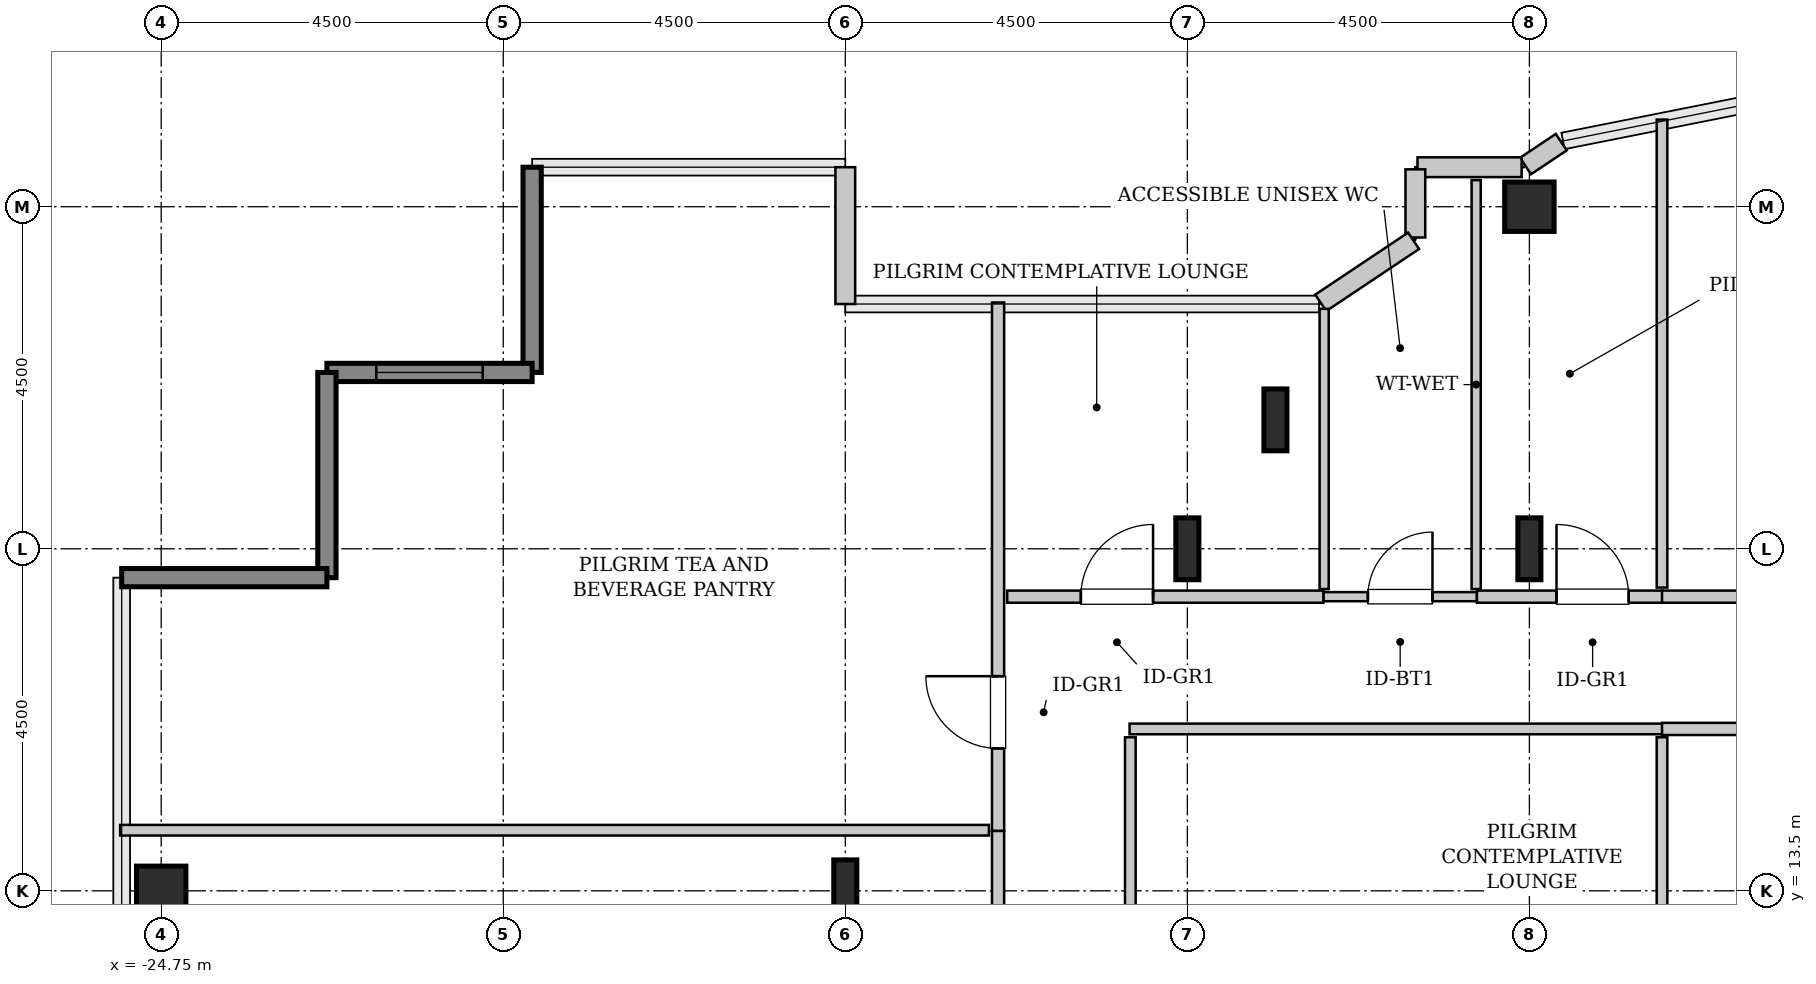
"""IFC4 building model, lengths in metres.
Left out: names, types, materials, properties, quantities, classifications, styles, units other than length and angle.
Written with IfcOpenShell. Run it as: python <this file> out.ifc"""

import sys

from ifc_helpers import new_model, si_unit, direction, frame, frame_2d, origin, origin_2d, place, context, subcontext, project, spatial, rectangle, hollow_rectangle, i_section, extrude, source, transform, mapped, element, fill, save


model = new_model("IFC4")
c1 = context("Model", 3, precision=1e-05, world=origin(), true_north=direction((0.0, 1.0)))
c2 = subcontext(c1, "Body", "Model", "MODEL_VIEW")
j1 = project(units=[si_unit("LENGTHUNIT", "METRE"), si_unit("PLANEANGLEUNIT", "RADIAN")], contexts=[c1])
p1 = place(None, origin())
s1 = spatial("IfcSite", under=j1, at=p1, CompositionType="ELEMENT")
p2 = place(p1, origin())
s2 = spatial("IfcBuilding", under=s1, at=p2, CompositionType="ELEMENT")
p3 = place(p2, frame((0.0, 0.0, 244.6)))
s3 = spatial("IfcBuildingStorey", under=s2, at=p3, CompositionType="ELEMENT", Elevation=244.6)
m1 = source(origin(), c2, "Body", "SweptSolid", [
    extrude(hollow_rectangle(XDim=0.65, YDim=0.65, WallThickness=0.032, InnerFilletRadius=0.032, OuterFilletRadius=0.064, at=origin_2d()), origin(), (0.0, 0.0, 1.0), 3.8),
])
p4 = place(p3, frame((-24.75, 13.5, 0.0), z_axis=(0.0, 0.0, 1.0), x_axis=(1.0, 0.0, 0.0)))
e1 = element("IfcColumn", 1, at=p4, inside=s3, PredefinedType="COLUMN", context=c2, shape_type="MappedRepresentation", body=[
    mapped(m1, transform((0.0, 0.0, 0.0), x_axis=(1.0, 0.0, 0.0), y_axis=(0.0, 1.0, 0.0), z_axis=(0.0, 0.0, 1.0), scale=1.0)),
])
m2 = source(origin(), c2, "Body", "SweptSolid", [
    extrude(i_section(OverallWidth=0.303, OverallDepth=0.814, WebThickness=0.021, FlangeThickness=0.04, FilletRadius=0.03, at=origin_2d()), origin(), (0.0, 0.0, 1.0), 3.8),
])
for number, where, z_axis, x_axis in (
    (2, (-15.75, 13.5, 0.0), (0.0, 0.0, 1.0), (1.0, 0.0, 0.0)),
    (3, (-11.25, 18.0, 0.0), (0.0, 0.0, 1.0), (1.0, 0.0, 0.0)),
    (4, (-10.091, 19.696, 0.0), (0.0, 0.0, 1.0), (1.0, 0.0, 0.0)),
    (5, (-6.75, 18.0, 0.0), (0.0, 0.0, 1.0), (1.0, 0.0, 0.0)),
):
    element("IfcColumn", number, at=place(p3, frame(where, z_axis=z_axis, x_axis=x_axis)), inside=s3, PredefinedType="COLUMN", context=c2, shape_type="MappedRepresentation", body=[
        mapped(m2, transform((0.0, 0.0, 0.0), x_axis=(1.0, 0.0, 0.0), y_axis=(0.0, 1.0, 0.0), z_axis=(0.0, 0.0, 1.0), scale=1.0)),
    ])
p5 = place(p3, frame((-6.75, 22.5, 0.0), z_axis=(0.0, 0.0, 1.0), x_axis=(1.0, 0.0, 0.0)))
e6 = element("IfcColumn", 6, at=p5, inside=s3, PredefinedType="COLUMN", context=c2, shape_type="MappedRepresentation", body=[
    mapped(m1, transform((0.0, 0.0, 0.0), x_axis=(1.0, 0.0, 0.0), y_axis=(0.0, 1.0, 0.0), z_axis=(0.0, 0.0, 1.0), scale=1.0)),
])
m3 = source(origin(), c2, "Body", "SweptSolid", [
    extrude(rectangle(XDim=0.565, YDim=0.26, at=frame_2d((0.283, 0.0))), origin(), (0.0, 0.0, 1.0), 3.55),
])
p6 = place(p3, frame((-6.331, 23.35, 0.0), z_axis=(0.0, 0.0, 1.0), x_axis=(-0.831651492666, -0.555297933317, 0.0)))
e7 = element("IfcWall", 7, at=p6, inside=s3, PredefinedType="SOLIDWALL", context=c2, shape_type="MappedRepresentation", body=[
    mapped(m3, transform((0.0, 0.0, 0.0), x_axis=(1.0, 0.0, 0.0), y_axis=(0.0, 1.0, 0.0), z_axis=(0.0, 0.0, 1.0), scale=1.0)),
])
m4 = source(origin(), c2, "Body", "SweptSolid", [
    extrude(rectangle(XDim=1.37, YDim=0.26, at=frame_2d((0.685, 0.0))), origin(), (0.0, 0.0, 1.0), 3.55),
])
p7 = place(p3, frame((-6.852, 23.02, 0.0), z_axis=(0.0, 0.0, 1.0), x_axis=(-1.0, 0.0, 0.0)))
e8 = element("IfcWall", 8, at=p7, inside=s3, PredefinedType="SOLIDWALL", context=c2, shape_type="MappedRepresentation", body=[
    mapped(m4, transform((0.0, 0.0, 0.0), x_axis=(1.0, 0.0, 0.0), y_axis=(0.0, 1.0, 0.0), z_axis=(0.0, 0.0, 1.0), scale=1.0)),
])
m5 = source(origin(), c2, "Body", "SweptSolid", [
    extrude(rectangle(XDim=0.897, YDim=0.26, at=frame_2d((0.448, 0.0))), origin(), (0.0, 0.0, 1.0), 3.55),
])
p8 = place(p3, frame((-8.25, 22.992, 0.0), z_axis=(0.0, 0.0, 1.0), x_axis=(0.0, -1.0, 0.0)))
e9 = element("IfcWall", 9, at=p8, inside=s3, PredefinedType="SOLIDWALL", context=c2, shape_type="MappedRepresentation", body=[
    mapped(m5, transform((0.0, 0.0, 0.0), x_axis=(1.0, 0.0, 0.0), y_axis=(0.0, 1.0, 0.0), z_axis=(0.0, 0.0, 1.0), scale=1.0)),
])
m6 = source(origin(), c2, "Body", "SweptSolid", [
    extrude(rectangle(XDim=1.469, YDim=0.26, at=frame_2d((0.734, 0.0))), origin(), (0.0, 0.0, 1.0), 3.55),
])
p9 = place(p3, frame((-8.273, 22.052, 0.0), z_axis=(0.0, 0.0, 1.0), x_axis=(-0.831461760506, -0.555581983884, 0.0)))
e10 = element("IfcWall", 10, at=p9, inside=s3, PredefinedType="SOLIDWALL", context=c2, shape_type="MappedRepresentation", body=[
    mapped(m6, transform((0.0, 0.0, 0.0), x_axis=(1.0, 0.0, 0.0), y_axis=(0.0, 1.0, 0.0), z_axis=(0.0, 0.0, 1.0), scale=1.0)),
])
m7 = source(origin(), c2, "Body", "SweptSolid", [
    extrude(rectangle(XDim=1.8, YDim=0.26, at=frame_2d((0.9, 0.0))), origin(), (0.0, 0.0, 1.0), 3.55),
])
p10 = place(p3, frame((-15.75, 21.22, 0.0), z_axis=(0.0, 0.0, 1.0), x_axis=(0.0, 1.0, 0.0)))
e11 = element("IfcWall", 11, at=p10, inside=s3, PredefinedType="SOLIDWALL", context=c2, shape_type="MappedRepresentation", body=[
    mapped(m7, transform((0.0, 0.0, 0.0), x_axis=(1.0, 0.0, 0.0), y_axis=(0.0, 1.0, 0.0), z_axis=(0.0, 0.0, 1.0), scale=1.0)),
])
m8 = source(origin(), c2, "Body", "SweptSolid", [
    extrude(rectangle(XDim=2.7, YDim=0.24, at=frame_2d((1.35, 0.0))), origin(), (0.0, 0.0, 1.0), 3.55),
])
p11 = place(p3, frame((-19.87, 23.02, 0.0), z_axis=(0.0, 0.0, 1.0), x_axis=(0.0, -1.0, 0.0)))
e12 = element("IfcWall", 12, at=p11, inside=s3, PredefinedType="SHEAR", context=c2, shape_type="MappedRepresentation", body=[
    mapped(m8, transform((0.0, 0.0, 0.0), x_axis=(1.0, 0.0, 0.0), y_axis=(0.0, 1.0, 0.0), z_axis=(0.0, 0.0, 1.0), scale=1.0)),
])
p12 = place(p3, frame((-19.87, 20.32, 0.0), z_axis=(0.0, 0.0, 1.0), x_axis=(-1.0, 0.0, 0.0)))
e13 = element("IfcWall", 13, at=p12, inside=s3, PredefinedType="SHEAR", context=c2, shape_type="MappedRepresentation", body=[
    mapped(m8, transform((0.0, 0.0, 0.0), x_axis=(1.0, 0.0, 0.0), y_axis=(0.0, 1.0, 0.0), z_axis=(0.0, 0.0, 1.0), scale=1.0)),
])
p13 = place(p12, frame((0.65, 0.0, 0.85)))
e14 = element("IfcOpeningElement", 14, at=p13, cuts=e13, PredefinedType="OPENING", context=c2, shape_type="SweptSolid", body=[
    extrude(rectangle(XDim=1.4, YDim=1.8, at=frame_2d((0.7, 0.9))), frame((0.0, 0.13, 0.0), z_axis=(0.0, -1.0, 0.0), x_axis=(1.0, 0.0, 0.0)), (0.0, 0.0, 1.0), 0.26),
])
for number, where, z_axis, x_axis in (
    (15, (-22.57, 20.32, 0.0), (0.0, 0.0, 1.0), (0.0, -1.0, 0.0)),
    (16, (-22.57, 17.62, 0.0), (0.0, 0.0, 1.0), (-1.0, 0.0, 0.0)),
):
    element("IfcWall", number, at=place(p3, frame(where, z_axis=z_axis, x_axis=x_axis)), inside=s3, PredefinedType="SHEAR", context=c2, shape_type="MappedRepresentation", body=[
        mapped(m8, transform((0.0, 0.0, 0.0), x_axis=(1.0, 0.0, 0.0), y_axis=(0.0, 1.0, 0.0), z_axis=(0.0, 0.0, 1.0), scale=1.0)),
    ])
m9 = source(origin(), c2, "Body", "SweptSolid", [
    extrude(rectangle(XDim=2.02, YDim=0.12, at=frame_2d((1.01, 0.0))), origin(), (0.0, 0.0, 1.0), 3.535),
])
p14 = place(p3, frame((-9.46, 17.37, 0.0), z_axis=(0.0, 0.0, 1.0), x_axis=(1.0, 0.0, 0.0)))
e17 = element("IfcWall", 17, at=p14, inside=s3, PredefinedType="PLUMBINGWALL", context=c2, shape_type="MappedRepresentation", body=[
    mapped(m9, transform((0.0, 0.0, 0.0), x_axis=(1.0, 0.0, 0.0), y_axis=(0.0, 1.0, 0.0), z_axis=(0.0, 0.0, 1.0), scale=1.0)),
])
p15 = place(p14, frame((0.585, 0.0, 0.0)))
e18 = element("IfcOpeningElement", 18, at=p15, cuts=e17, PredefinedType="OPENING", context=c2, shape_type="SweptSolid", body=[
    extrude(rectangle(XDim=0.85, YDim=2.1, at=frame_2d((0.425, 1.05))), frame((0.0, 0.07, 0.0), z_axis=(0.0, -1.0, 0.0), x_axis=(1.0, 0.0, 0.0)), (0.0, 0.0, 1.0), 0.14),
])
m10 = source(origin(), c2, "Body", "SweptSolid", [
    extrude(rectangle(XDim=5.38, YDim=0.12, at=frame_2d((2.69, 0.0))), origin(), (0.0, 0.0, 1.0), 3.535),
])
p16 = place(p3, frame((-7.45, 17.47, 0.0), z_axis=(0.0, 0.0, 1.0), x_axis=(0.0, 1.0, 0.0)))
e19 = element("IfcWall", 19, at=p16, inside=s3, PredefinedType="PLUMBINGWALL", context=c2, shape_type="MappedRepresentation", body=[
    mapped(m10, transform((0.0, 0.0, 0.0), x_axis=(1.0, 0.0, 0.0), y_axis=(0.0, 1.0, 0.0), z_axis=(0.0, 0.0, 1.0), scale=1.0)),
])
m11 = source(origin(), c2, "Body", "SweptSolid", [
    extrude(rectangle(XDim=3.687, YDim=0.12, at=frame_2d((1.843, 0.0))), origin(), (0.0, 0.0, 1.0), 3.535),
])
p17 = place(p3, frame((-9.45, 17.47, 0.0), z_axis=(0.0, 0.0, 1.0), x_axis=(0.0, 1.0, 0.0)))
e20 = element("IfcWall", 20, at=p17, inside=s3, PredefinedType="PLUMBINGWALL", context=c2, shape_type="MappedRepresentation", body=[
    mapped(m11, transform((0.0, 0.0, 0.0), x_axis=(1.0, 0.0, 0.0), y_axis=(0.0, 1.0, 0.0), z_axis=(0.0, 0.0, 1.0), scale=1.0)),
])
m12 = source(origin(), c2, "Body", "SweptSolid", [
    extrude(rectangle(XDim=6.952, YDim=0.16, at=frame_2d((3.476, 0.0))), origin(), (0.0, 0.0, 1.0), 3.535),
])
p18 = place(p3, frame((-13.74, 14.288, 0.0), z_axis=(0.0, 0.0, 1.0), x_axis=(0.0, 1.0, 0.0)))
e21 = element("IfcWall", 21, at=p18, inside=s3, PredefinedType="PARTITIONING", context=c2, shape_type="MappedRepresentation", body=[
    mapped(m12, transform((0.0, 0.0, 0.0), x_axis=(1.0, 0.0, 0.0), y_axis=(0.0, 1.0, 0.0), z_axis=(0.0, 0.0, 1.0), scale=1.0)),
])
p19 = place(p18, frame((1.086, 0.0, 0.0)))
e22 = element("IfcOpeningElement", 22, at=p19, cuts=e21, PredefinedType="OPENING", context=c2, shape_type="SweptSolid", body=[
    extrude(rectangle(XDim=0.95, YDim=2.1, at=frame_2d((0.475, 1.05))), frame((0.0, 0.09, 0.0), z_axis=(0.0, -1.0, 0.0), x_axis=(1.0, 0.0, 0.0)), (0.0, 0.0, 1.0), 0.18),
])
m13 = source(origin(), c2, "Body", "SweptSolid", [
    extrude(rectangle(XDim=11.43, YDim=0.14, at=frame_2d((5.715, 0.0))), origin(), (0.0, 0.0, 1.0), 3.535),
])
p20 = place(p3, frame((-25.29, 14.298, 0.0), z_axis=(0.0, 0.0, 1.0), x_axis=(1.0, 0.0, 0.0)))
e23 = element("IfcWall", 23, at=p20, inside=s3, PredefinedType="PARTITIONING", context=c2, shape_type="MappedRepresentation", body=[
    mapped(m13, transform((0.0, 0.0, 0.0), x_axis=(1.0, 0.0, 0.0), y_axis=(0.0, 1.0, 0.0), z_axis=(0.0, 0.0, 1.0), scale=1.0)),
])
m14 = source(origin(), c2, "Body", "SweptSolid", [
    extrude(rectangle(XDim=8.693, YDim=0.16, at=frame_2d((4.346, 0.0))), origin(), (0.0, 0.0, 1.0), 3.535),
])
p21 = place(p3, frame((-13.74, 5.595, 0.0), z_axis=(0.0, 0.0, 1.0), x_axis=(0.0, 1.0, 0.0)))
e24 = element("IfcWall", 24, at=p21, inside=s3, PredefinedType="PARTITIONING", context=c2, shape_type="MappedRepresentation", body=[
    mapped(m14, transform((0.0, 0.0, 0.0), x_axis=(1.0, 0.0, 0.0), y_axis=(0.0, 1.0, 0.0), z_axis=(0.0, 0.0, 1.0), scale=1.0)),
])
p22 = place(p21, frame((3.871, 0.0, 0.0)))
e25 = element("IfcOpeningElement", 25, at=p22, cuts=e24, PredefinedType="OPENING", context=c2, shape_type="SweptSolid", body=[
    extrude(rectangle(XDim=0.95, YDim=2.1, at=frame_2d((0.475, 1.05))), frame((0.0, 0.09, 0.0), z_axis=(0.0, -1.0, 0.0), x_axis=(1.0, 0.0, 0.0)), (0.0, 0.0, 1.0), 0.18),
])
m15 = source(origin(), c2, "Body", "SweptSolid", [
    extrude(rectangle(XDim=7.015, YDim=0.14, at=frame_2d((3.507, 0.0))), origin(), (0.0, 0.0, 1.0), 3.535),
])
p23 = place(p3, frame((-12.01, 15.63, 0.0), z_axis=(0.0, 0.0, 1.0), x_axis=(1.0, 0.0, 0.0)))
e26 = element("IfcWall", 26, at=p23, inside=s3, PredefinedType="PARTITIONING", context=c2, shape_type="MappedRepresentation", body=[
    mapped(m15, transform((0.0, 0.0, 0.0), x_axis=(1.0, 0.0, 0.0), y_axis=(0.0, 1.0, 0.0), z_axis=(0.0, 0.0, 1.0), scale=1.0)),
])
m16 = source(origin(), c2, "Body", "SweptSolid", [
    extrude(rectangle(XDim=3.93, YDim=0.14, at=frame_2d((1.965, 0.0))), origin(), (0.0, 0.0, 1.0), 3.535),
])
for number, where, z_axis, x_axis in (
    (27, (-12.0, 11.59, 0.0), (0.0, 0.0, 1.0), (0.0, 1.0, 0.0)),
    (28, (-5.005, 11.59, 0.0), (0.0, 0.0, 1.0), (0.0, 1.0, 0.0)),
):
    element("IfcWall", number, at=place(p3, frame(where, z_axis=z_axis, x_axis=x_axis)), inside=s3, PredefinedType="PARTITIONING", context=c2, shape_type="MappedRepresentation", body=[
        mapped(m16, transform((0.0, 0.0, 0.0), x_axis=(1.0, 0.0, 0.0), y_axis=(0.0, 1.0, 0.0), z_axis=(0.0, 0.0, 1.0), scale=1.0)),
    ])
m17 = source(origin(), c2, "Body", "SweptSolid", [
    extrude(rectangle(XDim=2.445, YDim=0.16, at=frame_2d((1.222, 0.0))), origin(), (0.0, 0.0, 1.0), 3.535),
])
p24 = place(p3, frame((-7.44, 17.37, 0.0), z_axis=(0.0, 0.0, 1.0), x_axis=(1.0, 0.0, 0.0)))
e29 = element("IfcWall", 29, at=p24, inside=s3, PredefinedType="PARTITIONING", context=c2, shape_type="MappedRepresentation", body=[
    mapped(m17, transform((0.0, 0.0, 0.0), x_axis=(1.0, 0.0, 0.0), y_axis=(0.0, 1.0, 0.0), z_axis=(0.0, 0.0, 1.0), scale=1.0)),
])
p25 = place(p24, frame((1.047, 0.0, 0.0)))
e30 = element("IfcOpeningElement", 30, at=p25, cuts=e29, PredefinedType="OPENING", context=c2, shape_type="SweptSolid", body=[
    extrude(rectangle(XDim=0.95, YDim=2.1, at=frame_2d((0.475, 1.05))), frame((0.0, 0.09, 0.0), z_axis=(0.0, -1.0, 0.0), x_axis=(1.0, 0.0, 0.0)), (0.0, 0.0, 1.0), 0.18),
])
m18 = source(origin(), c2, "Body", "SweptSolid", [
    extrude(rectangle(XDim=6.157, YDim=0.14, at=frame_2d((3.078, 0.0))), origin(), (0.0, 0.0, 1.0), 3.535),
])
p26 = place(p3, frame((-5.005, 17.49, 0.0), z_axis=(0.0, 0.0, 1.0), x_axis=(0.0, 1.0, 0.0)))
e31 = element("IfcWall", 31, at=p26, inside=s3, PredefinedType="PARTITIONING", context=c2, shape_type="MappedRepresentation", body=[
    mapped(m18, transform((0.0, 0.0, 0.0), x_axis=(1.0, 0.0, 0.0), y_axis=(0.0, 1.0, 0.0), z_axis=(0.0, 0.0, 1.0), scale=1.0)),
])
m19 = source(origin(), c2, "Body", "SweptSolid", [
    extrude(rectangle(XDim=4.16, YDim=0.16, at=frame_2d((2.08, 0.0))), origin(), (0.0, 0.0, 1.0), 3.535),
])
p27 = place(p3, frame((-13.62, 17.37, 0.0), z_axis=(0.0, 0.0, 1.0), x_axis=(1.0, 0.0, 0.0)))
e32 = element("IfcWall", 32, at=p27, inside=s3, PredefinedType="PARTITIONING", context=c2, shape_type="MappedRepresentation", body=[
    mapped(m19, transform((0.0, 0.0, 0.0), x_axis=(1.0, 0.0, 0.0), y_axis=(0.0, 1.0, 0.0), z_axis=(0.0, 0.0, 1.0), scale=1.0)),
])
p28 = place(p27, frame((0.969, 0.0, 0.0)))
e33 = element("IfcOpeningElement", 33, at=p28, cuts=e32, PredefinedType="OPENING", context=c2, shape_type="SweptSolid", body=[
    extrude(rectangle(XDim=0.95, YDim=2.1, at=frame_2d((0.475, 1.05))), frame((0.0, 0.09, 0.0), z_axis=(0.0, -1.0, 0.0), x_axis=(1.0, 0.0, 0.0)), (0.0, 0.0, 1.0), 0.18),
])
m20 = source(origin(), c2, "Body", "SweptSolid", [
    extrude(rectangle(XDim=7.21, YDim=0.16, at=frame_2d((3.605, 0.0))), origin(), (0.0, 0.0, 1.0), 3.535),
])
p29 = place(p3, frame((-5.005, 17.37, 0.0), z_axis=(0.0, 0.0, 1.0), x_axis=(1.0, 0.0, 0.0)))
e34 = element("IfcWall", 34, at=p29, inside=s3, PredefinedType="PARTITIONING", context=c2, shape_type="MappedRepresentation", body=[
    mapped(m20, transform((0.0, 0.0, 0.0), x_axis=(1.0, 0.0, 0.0), y_axis=(0.0, 1.0, 0.0), z_axis=(0.0, 0.0, 1.0), scale=1.0)),
])
p30 = place(p29, frame((3.13, 0.0, 0.0)))
e35 = element("IfcOpeningElement", 35, at=p30, cuts=e34, PredefinedType="OPENING", context=c2, shape_type="SweptSolid", body=[
    extrude(rectangle(XDim=0.95, YDim=2.1, at=frame_2d((0.475, 1.05))), frame((0.0, 0.09, 0.0), z_axis=(0.0, -1.0, 0.0), x_axis=(1.0, 0.0, 0.0)), (0.0, 0.0, 1.0), 0.18),
])
p31 = place(p3, frame((-5.005, 15.63, 0.0), z_axis=(0.0, 0.0, 1.0), x_axis=(1.0, 0.0, 0.0)))
e36 = element("IfcWall", 36, at=p31, inside=s3, PredefinedType="PARTITIONING", context=c2, shape_type="MappedRepresentation", body=[
    mapped(m20, transform((0.0, 0.0, 0.0), x_axis=(1.0, 0.0, 0.0), y_axis=(0.0, 1.0, 0.0), z_axis=(0.0, 0.0, 1.0), scale=1.0)),
])
p32 = place(p31, frame((3.13, 0.0, 0.0)))
e37 = element("IfcOpeningElement", 37, at=p32, cuts=e36, PredefinedType="OPENING", context=c2, shape_type="SweptSolid", body=[
    extrude(rectangle(XDim=0.95, YDim=2.1, at=frame_2d((0.475, 1.05))), frame((0.0, 0.09, 0.0), z_axis=(0.0, -1.0, 0.0), x_axis=(1.0, 0.0, 0.0)), (0.0, 0.0, 1.0), 0.18),
])
m21 = source(origin(), c2, "Body", "SweptSolid", [
    extrude(rectangle(XDim=1.4, YDim=1.8, at=frame_2d((0.7, 0.9))), frame((0.0, 0.03, 0.0), z_axis=(0.0, -1.0, 0.0), x_axis=(1.0, 0.0, 0.0)), (0.0, 0.0, 1.0), 0.06),
])
p33 = place(p13, origin())
e38 = element("IfcWindow", 38, at=p33, inside=s3, PartitioningType="SINGLE_PANEL", PredefinedType="WINDOW", context=c2, shape_type="MappedRepresentation", body=[
    mapped(m21, transform((0.0, 0.0, 0.0), x_axis=(1.0, 0.0, 0.0), y_axis=(0.0, 1.0, 0.0), z_axis=(0.0, 0.0, 1.0), scale=1.0)),
])
fill(e14, e38)
m22 = source(origin(), c2, "Body", "SweptSolid", [
    extrude(rectangle(XDim=0.85, YDim=2.1, at=frame_2d((0.425, 1.05))), frame((0.0, 0.025, 0.0), z_axis=(0.0, -1.0, 0.0), x_axis=(1.0, 0.0, 0.0)), (0.0, 0.0, 1.0), 0.05),
])
p34 = place(p15, origin())
e39 = element("IfcDoor", 39, at=p34, inside=s3, OperationType="SINGLE_SWING_RIGHT", PredefinedType="DOOR", context=c2, shape_type="MappedRepresentation", body=[
    mapped(m22, transform((0.0, 0.0, 0.0), x_axis=(1.0, 0.0, 0.0), y_axis=(0.0, 1.0, 0.0), z_axis=(0.0, 0.0, 1.0), scale=1.0)),
])
fill(e18, e39)
m23 = source(origin(), c2, "Body", "SweptSolid", [
    extrude(rectangle(XDim=0.95, YDim=2.1, at=frame_2d((0.475, 1.05))), frame((0.0, 0.025, 0.0), z_axis=(0.0, -1.0, 0.0), x_axis=(1.0, 0.0, 0.0)), (0.0, 0.0, 1.0), 0.05),
])
p35 = place(p19, origin())
e40 = element("IfcDoor", 40, at=p35, inside=s3, OperationType="SINGLE_SWING_RIGHT", PredefinedType="DOOR", context=c2, shape_type="MappedRepresentation", body=[
    mapped(m23, transform((0.0, 0.0, 0.0), x_axis=(1.0, 0.0, 0.0), y_axis=(0.0, 1.0, 0.0), z_axis=(0.0, 0.0, 1.0), scale=1.0)),
])
fill(e22, e40)
p36 = place(p25, origin())
e41 = element("IfcDoor", 41, at=p36, inside=s3, OperationType="SINGLE_SWING_LEFT", PredefinedType="DOOR", context=c2, shape_type="MappedRepresentation", body=[
    mapped(m23, transform((0.0, 0.0, 0.0), x_axis=(1.0, 0.0, 0.0), y_axis=(0.0, 1.0, 0.0), z_axis=(0.0, 0.0, 1.0), scale=1.0)),
])
fill(e30, e41)
p37 = place(p28, origin())
e42 = element("IfcDoor", 42, at=p37, inside=s3, OperationType="SINGLE_SWING_RIGHT", PredefinedType="DOOR", context=c2, shape_type="MappedRepresentation", body=[
    mapped(m23, transform((0.0, 0.0, 0.0), x_axis=(1.0, 0.0, 0.0), y_axis=(0.0, 1.0, 0.0), z_axis=(0.0, 0.0, 1.0), scale=1.0)),
])
fill(e33, e42)
save(model, sys.argv[1])
